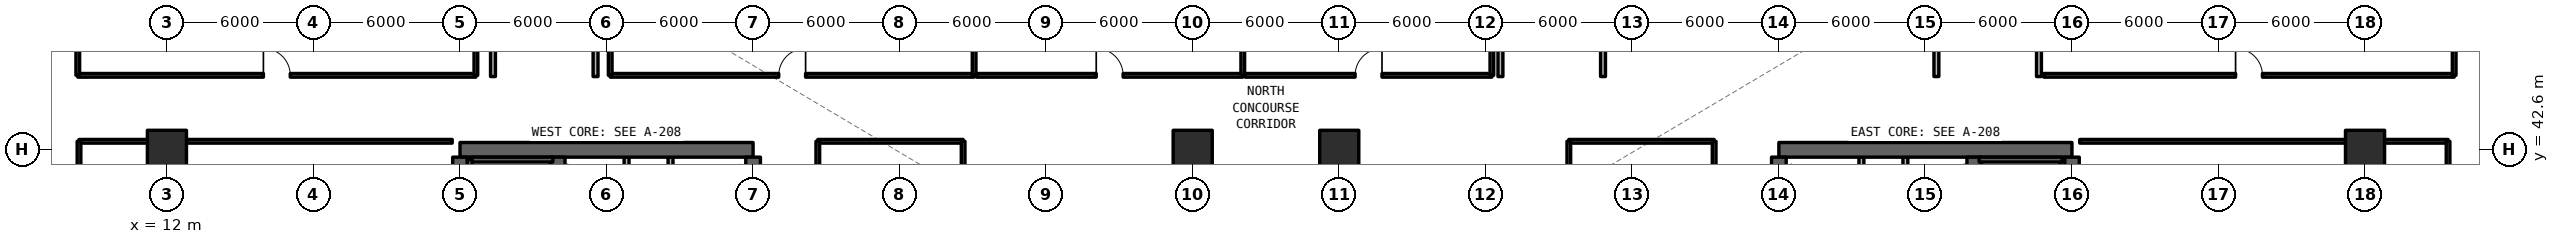
"""IFC4 building model, lengths in metres.
Left out: names, types, materials, properties, quantities, classifications, styles, units other than length and angle.
Written with IfcOpenShell. Run it as: python <this file> out.ifc"""

import sys

from ifc_helpers import new_model, si_unit, direction, frame, frame_2d, origin, origin_2d, place, context, subcontext, project, spatial, rectangle, extrude, element, fill, save


model = new_model("IFC4")
c1 = context("Model", 3, precision=1e-05, world=origin(), true_north=direction((0.0, 1.0)))
c2 = subcontext(c1, "Body", "Model", "MODEL_VIEW")
j1 = project(units=[si_unit("LENGTHUNIT", "METRE"), si_unit("PLANEANGLEUNIT", "RADIAN")], contexts=[c1])
p1 = place(None, origin())
s1 = spatial("IfcSite", under=j1, at=p1, CompositionType="ELEMENT")
p2 = place(p1, origin())
s2 = spatial("IfcBuilding", under=s1, at=p2, CompositionType="ELEMENT")
p3 = place(p2, frame((0.0, 0.0, 14.85)))
s3 = spatial("IfcBuildingStorey", under=s2, at=p3, CompositionType="ELEMENT", Elevation=14.85)
p4 = place(p3, frame((36.0, 42.6, 0.0), z_axis=(0.0, 0.0, 1.0), x_axis=(-1.0, 0.0, 0.0)))
e1 = element("IfcWall", 1, at=p4, inside=s3, PredefinedType="SHEAR", context=c2, shape_type="SweptSolid", body=[
    extrude(rectangle(XDim=12.0, YDim=0.6, at=frame_2d((6.0, 0.0))), origin(), (0.0, 0.0, 1.0), 4.62),
])
p5 = place(p3, frame((24.0, 24.9, 0.0), z_axis=(0.0, 0.0, 1.0), x_axis=(0.0, 1.0, 0.0)))
e2 = element("IfcWall", 2, at=p5, inside=s3, PredefinedType="SHEAR", context=c2, shape_type="SweptSolid", body=[
    extrude(rectangle(XDim=17.4, YDim=0.6, at=frame_2d((8.7, 0.0))), origin(), (0.0, 0.0, 1.0), 4.62),
])
p6 = place(p3, frame((36.0, 36.8, 0.0), z_axis=(0.0, 0.0, 1.0), x_axis=(0.0, 1.0, 0.0)))
e3 = element("IfcWall", 3, at=p6, inside=s3, PredefinedType="SHEAR", context=c2, shape_type="SweptSolid", body=[
    extrude(rectangle(XDim=5.5, YDim=0.6, at=frame_2d((2.75, 0.0))), origin(), (0.0, 0.0, 1.0), 4.62),
])
p7 = place(p3, frame((28.0, 24.9, 0.0), z_axis=(0.0, 0.0, 1.0), x_axis=(0.0, 1.0, 0.0)))
e4 = element("IfcWall", 4, at=p7, inside=s3, PredefinedType="SHEAR", context=c2, shape_type="SweptSolid", body=[
    extrude(rectangle(XDim=17.4, YDim=0.6, at=frame_2d((8.7, 0.0))), origin(), (0.0, 0.0, 1.0), 4.62),
])
p8 = place(p7, frame((0.35, 0.0, 0.0)))
e5 = element("IfcOpeningElement", 5, at=p8, cuts=e4, PredefinedType="OPENING", context=c2, shape_type="SweptSolid", body=[
    extrude(rectangle(XDim=1.15, YDim=2.15, at=frame_2d((0.575, 1.075))), frame((0.0, 0.31, 0.0), z_axis=(0.0, -1.0, 0.0), x_axis=(1.0, 0.0, 0.0)), (0.0, 0.0, 1.0), 0.62),
])
p9 = place(p7, frame((9.55, 0.0, 0.0)))
e6 = element("IfcOpeningElement", 6, at=p9, cuts=e4, PredefinedType="OPENING", context=c2, shape_type="SweptSolid", body=[
    extrude(rectangle(XDim=1.15, YDim=2.15, at=frame_2d((0.575, 1.075))), frame((0.0, 0.31, 0.0), z_axis=(0.0, -1.0, 0.0), x_axis=(1.0, 0.0, 0.0)), (0.0, 0.0, 1.0), 0.62),
])
p10 = place(p3, frame((90.0, 42.6, 0.0), z_axis=(0.0, 0.0, 1.0), x_axis=(-1.0, 0.0, 0.0)))
e7 = element("IfcWall", 7, at=p10, inside=s3, PredefinedType="SHEAR", context=c2, shape_type="SweptSolid", body=[
    extrude(rectangle(XDim=12.0, YDim=0.6, at=frame_2d((6.0, 0.0))), origin(), (0.0, 0.0, 1.0), 4.62),
])
p11 = place(p3, frame((90.0, 24.9, 0.0), z_axis=(0.0, 0.0, 1.0), x_axis=(0.0, 1.0, 0.0)))
e8 = element("IfcWall", 8, at=p11, inside=s3, PredefinedType="SHEAR", context=c2, shape_type="SweptSolid", body=[
    extrude(rectangle(XDim=17.4, YDim=0.6, at=frame_2d((8.7, 0.0))), origin(), (0.0, 0.0, 1.0), 4.62),
])
p12 = place(p3, frame((78.0, 36.8, 0.0), z_axis=(0.0, 0.0, 1.0), x_axis=(0.0, 1.0, 0.0)))
e9 = element("IfcWall", 9, at=p12, inside=s3, PredefinedType="SHEAR", context=c2, shape_type="SweptSolid", body=[
    extrude(rectangle(XDim=5.5, YDim=0.6, at=frame_2d((2.75, 0.0))), origin(), (0.0, 0.0, 1.0), 4.62),
])
p13 = place(p3, frame((86.0, 24.9, 0.0), z_axis=(0.0, 0.0, 1.0), x_axis=(0.0, 1.0, 0.0)))
e10 = element("IfcWall", 10, at=p13, inside=s3, PredefinedType="SHEAR", context=c2, shape_type="SweptSolid", body=[
    extrude(rectangle(XDim=17.4, YDim=0.6, at=frame_2d((8.7, 0.0))), origin(), (0.0, 0.0, 1.0), 4.62),
])
p14 = place(p13, frame((0.35, 0.0, 0.0)))
e11 = element("IfcOpeningElement", 11, at=p14, cuts=e10, PredefinedType="OPENING", context=c2, shape_type="SweptSolid", body=[
    extrude(rectangle(XDim=1.15, YDim=2.15, at=frame_2d((0.575, 1.075))), frame((0.0, 0.31, 0.0), z_axis=(0.0, -1.0, 0.0), x_axis=(1.0, 0.0, 0.0)), (0.0, 0.0, 1.0), 0.62),
])
p15 = place(p13, frame((9.55, 0.0, 0.0)))
e12 = element("IfcOpeningElement", 12, at=p15, cuts=e10, PredefinedType="OPENING", context=c2, shape_type="SweptSolid", body=[
    extrude(rectangle(XDim=1.15, YDim=2.15, at=frame_2d((0.575, 1.075))), frame((0.0, 0.31, 0.0), z_axis=(0.0, -1.0, 0.0), x_axis=(1.0, 0.0, 0.0)), (0.0, 0.0, 1.0), 0.62),
])
for number, where, z_axis, x_axis in (
    (13, (12.0, 42.6, 0.0), (0.0, 0.0, 1.0), (1.0, 0.0, 0.0)),
    (14, (54.0, 42.6, 0.0), (0.0, 0.0, 1.0), (1.0, 0.0, 0.0)),
    (15, (60.0, 42.6, 0.0), (0.0, 0.0, 1.0), (1.0, 0.0, 0.0)),
    (16, (102.0, 42.6, 0.0), (0.0, 0.0, 1.0), (1.0, 0.0, 0.0)),
):
    element("IfcColumn", number, at=place(p3, frame(where, z_axis=z_axis, x_axis=x_axis)), inside=s3, PredefinedType="COLUMN", context=c2, shape_type="SweptSolid", body=[
        extrude(rectangle(XDim=1.6, YDim=1.6, at=origin_2d()), origin(), (0.0, 0.0, 1.0), 4.62),
    ])
for number, where, z_axis, x_axis in (
    (17, (30.82, 36.88, 0.0), (0.0, 0.0, 1.0), (0.0, 1.0, 0.0)),
    (18, (32.62, 36.88, 0.0), (0.0, 0.0, 1.0), (0.0, 1.0, 0.0)),
    (19, (83.18, 36.88, 0.0), (0.0, 0.0, 1.0), (0.0, 1.0, 0.0)),
    (20, (81.38, 36.88, 0.0), (0.0, 0.0, 1.0), (0.0, 1.0, 0.0)),
):
    element("IfcWall", number, at=place(p3, frame(where, z_axis=z_axis, x_axis=x_axis)), inside=s3, PredefinedType="SOLIDWALL", context=c2, shape_type="SweptSolid", body=[
        extrude(rectangle(XDim=5.42, YDim=0.2, at=frame_2d((2.71, 0.0))), origin(), (0.0, 0.0, 1.0), 3.56),
    ])
for number, where, z_axis, x_axis in (
    (21, (25.35, 45.6, 0.0), (0.0, 0.0, 1.0), (0.0, 1.0, 0.0)),
    (22, (29.55, 45.6, 0.0), (0.0, 0.0, 1.0), (0.0, 1.0, 0.0)),
    (23, (66.6, 45.6, 0.0), (0.0, 0.0, 1.0), (0.0, 1.0, 0.0)),
    (24, (70.8, 45.6, 0.0), (0.0, 0.0, 1.0), (0.0, 1.0, 0.0)),
    (25, (84.45, 45.6, 0.0), (0.0, 0.0, 1.0), (0.0, 1.0, 0.0)),
    (26, (88.65, 45.6, 0.0), (0.0, 0.0, 1.0), (0.0, 1.0, 0.0)),
):
    element("IfcWall", number, at=place(p3, frame(where, z_axis=z_axis, x_axis=x_axis)), inside=s3, PredefinedType="SOLIDWALL", context=c2, shape_type="SweptSolid", body=[
        extrude(rectangle(XDim=4.6, YDim=0.2, at=frame_2d((2.3, 0.0))), origin(), (0.0, 0.0, 1.0), 3.56),
    ])
p16 = place(p3, frame((8.35, 45.65, 0.0), z_axis=(0.0, 0.0, 1.0), x_axis=(1.0, 0.0, 0.0)))
e27 = element("IfcWall", 27, at=p16, inside=s3, PredefinedType="SOLIDWALL", context=c2, shape_type="SweptSolid", body=[
    extrude(rectangle(XDim=16.3, YDim=0.15, at=frame_2d((8.15, 0.0))), origin(), (0.0, 0.0, 1.0), 3.56),
])
p17 = place(p16, frame((7.6, 0.0, 0.0)))
e28 = element("IfcOpeningElement", 28, at=p17, cuts=e27, PredefinedType="OPENING", context=c2, shape_type="SweptSolid", body=[
    extrude(rectangle(XDim=1.1, YDim=2.15, at=frame_2d((0.55, 1.075))), frame((0.0, 0.085, 0.0), z_axis=(0.0, -1.0, 0.0), x_axis=(1.0, 0.0, 0.0)), (0.0, 0.0, 1.0), 0.17),
])
for number, where, z_axis, x_axis in (
    (29, (8.35, 45.65, 0.0), (0.0, 0.0, 1.0), (0.0, 1.0, 0.0)),
    (30, (24.65, 45.65, 0.0), (0.0, 0.0, 1.0), (0.0, 1.0, 0.0)),
):
    element("IfcWall", number, at=place(p3, frame(where, z_axis=z_axis, x_axis=x_axis)), inside=s3, PredefinedType="SOLIDWALL", context=c2, shape_type="SweptSolid", body=[
        extrude(rectangle(XDim=18.41, YDim=0.15, at=frame_2d((9.205, 0.0))), origin(), (0.0, 0.0, 1.0), 3.56),
    ])
p18 = place(p3, frame((30.15, 45.65, 0.0), z_axis=(0.0, 0.0, 1.0), x_axis=(1.0, 0.0, 0.0)))
e31 = element("IfcWall", 31, at=p18, inside=s3, PredefinedType="SOLIDWALL", context=c2, shape_type="SweptSolid", body=[
    extrude(rectangle(XDim=14.9, YDim=0.15, at=frame_2d((7.45, 0.0))), origin(), (0.0, 0.0, 1.0), 3.56),
])
p19 = place(p18, frame((6.9, 0.0, 0.0)))
e32 = element("IfcOpeningElement", 32, at=p19, cuts=e31, PredefinedType="OPENING", context=c2, shape_type="SweptSolid", body=[
    extrude(rectangle(XDim=1.1, YDim=2.15, at=frame_2d((0.55, 1.075))), frame((0.0, 0.085, 0.0), z_axis=(0.0, -1.0, 0.0), x_axis=(1.0, 0.0, 0.0)), (0.0, 0.0, 1.0), 0.17),
])
for number, where, z_axis, x_axis in (
    (33, (30.15, 45.65, 0.0), (0.0, 0.0, 1.0), (0.0, 1.0, 0.0)),
    (34, (45.05, 45.65, 0.0), (0.0, 0.0, 1.0), (0.0, 1.0, 0.0)),
):
    element("IfcWall", number, at=place(p3, frame(where, z_axis=z_axis, x_axis=x_axis)), inside=s3, PredefinedType="SOLIDWALL", context=c2, shape_type="SweptSolid", body=[
        extrude(rectangle(XDim=18.41, YDim=0.15, at=frame_2d((9.205, 0.0))), origin(), (0.0, 0.0, 1.0), 3.56),
    ])
p20 = place(p3, frame((45.15, 45.65, 0.0), z_axis=(0.0, 0.0, 1.0), x_axis=(1.0, 0.0, 0.0)))
e35 = element("IfcWall", 35, at=p20, inside=s3, PredefinedType="SOLIDWALL", context=c2, shape_type="SweptSolid", body=[
    extrude(rectangle(XDim=10.9, YDim=0.15, at=frame_2d((5.45, 0.0))), origin(), (0.0, 0.0, 1.0), 3.56),
])
p21 = place(p20, frame((4.9, 0.0, 0.0)))
e36 = element("IfcOpeningElement", 36, at=p21, cuts=e35, PredefinedType="OPENING", context=c2, shape_type="SweptSolid", body=[
    extrude(rectangle(XDim=1.1, YDim=2.15, at=frame_2d((0.55, 1.075))), frame((0.0, 0.085, 0.0), z_axis=(0.0, -1.0, 0.0), x_axis=(1.0, 0.0, 0.0)), (0.0, 0.0, 1.0), 0.17),
])
p22 = place(p3, frame((56.05, 45.65, 0.0), z_axis=(0.0, 0.0, 1.0), x_axis=(0.0, 1.0, 0.0)))
e37 = element("IfcWall", 37, at=p22, inside=s3, PredefinedType="SOLIDWALL", context=c2, shape_type="SweptSolid", body=[
    extrude(rectangle(XDim=18.41, YDim=0.15, at=frame_2d((9.205, 0.0))), origin(), (0.0, 0.0, 1.0), 3.56),
])
p23 = place(p3, frame((56.15, 45.65, 0.0), z_axis=(0.0, 0.0, 1.0), x_axis=(1.0, 0.0, 0.0)))
e38 = element("IfcWall", 38, at=p23, inside=s3, PredefinedType="SOLIDWALL", context=c2, shape_type="SweptSolid", body=[
    extrude(rectangle(XDim=10.1, YDim=0.15, at=frame_2d((5.05, 0.0))), origin(), (0.0, 0.0, 1.0), 3.56),
])
p24 = place(p23, frame((4.5, 0.0, 0.0)))
e39 = element("IfcOpeningElement", 39, at=p24, cuts=e38, PredefinedType="OPENING", context=c2, shape_type="SweptSolid", body=[
    extrude(rectangle(XDim=1.1, YDim=2.15, at=frame_2d((0.55, 1.075))), frame((0.0, 0.085, 0.0), z_axis=(0.0, -1.0, 0.0), x_axis=(1.0, 0.0, 0.0)), (0.0, 0.0, 1.0), 0.17),
])
p25 = place(p3, frame((66.25, 45.65, 0.0), z_axis=(0.0, 0.0, 1.0), x_axis=(0.0, 1.0, 0.0)))
e40 = element("IfcWall", 40, at=p25, inside=s3, PredefinedType="SOLIDWALL", context=c2, shape_type="SweptSolid", body=[
    extrude(rectangle(XDim=18.41, YDim=0.15, at=frame_2d((9.205, 0.0))), origin(), (0.0, 0.0, 1.0), 3.56),
])
p26 = place(p3, frame((88.85, 45.65, 0.0), z_axis=(0.0, 0.0, 1.0), x_axis=(1.0, 0.0, 0.0)))
e41 = element("IfcWall", 41, at=p26, inside=s3, PredefinedType="SOLIDWALL", context=c2, shape_type="SweptSolid", body=[
    extrude(rectangle(XDim=16.8, YDim=0.15, at=frame_2d((8.4, 0.0))), origin(), (0.0, 0.0, 1.0), 3.56),
])
p27 = place(p26, frame((7.85, 0.0, 0.0)))
e42 = element("IfcOpeningElement", 42, at=p27, cuts=e41, PredefinedType="OPENING", context=c2, shape_type="SweptSolid", body=[
    extrude(rectangle(XDim=1.1, YDim=2.15, at=frame_2d((0.55, 1.075))), frame((0.0, 0.085, 0.0), z_axis=(0.0, -1.0, 0.0), x_axis=(1.0, 0.0, 0.0)), (0.0, 0.0, 1.0), 0.17),
])
p28 = place(p3, frame((105.65, 45.65, 0.0), z_axis=(0.0, 0.0, 1.0), x_axis=(0.0, 1.0, 0.0)))
e43 = element("IfcWall", 43, at=p28, inside=s3, PredefinedType="SOLIDWALL", context=c2, shape_type="SweptSolid", body=[
    extrude(rectangle(XDim=18.41, YDim=0.15, at=frame_2d((9.205, 0.0))), origin(), (0.0, 0.0, 1.0), 3.56),
])
p29 = place(p3, frame((38.65, 42.95, 0.0), z_axis=(0.0, 0.0, 1.0), x_axis=(1.0, 0.0, 0.0)))
e44 = element("IfcWall", 44, at=p29, inside=s3, PredefinedType="SOLIDWALL", context=c2, shape_type="SweptSolid", body=[
    extrude(rectangle(XDim=5.95, YDim=0.15, at=frame_2d((2.975, 0.0))), origin(), (0.0, 0.0, 1.0), 3.56),
])
p30 = place(p3, frame((38.65, 24.25, 0.0), z_axis=(0.0, 0.0, 1.0), x_axis=(0.0, 1.0, 0.0)))
e45 = element("IfcWall", 45, at=p30, inside=s3, PredefinedType="SOLIDWALL", context=c2, shape_type="SweptSolid", body=[
    extrude(rectangle(XDim=18.7, YDim=0.15, at=frame_2d((9.35, 0.0))), origin(), (0.0, 0.0, 1.0), 3.56),
])
p31 = place(p30, frame((8.525, 0.0, 0.0)))
e46 = element("IfcOpeningElement", 46, at=p31, cuts=e45, PredefinedType="OPENING", context=c2, shape_type="SweptSolid", body=[
    extrude(rectangle(XDim=0.95, YDim=2.15, at=frame_2d((0.475, 1.075))), frame((0.0, 0.085, 0.0), z_axis=(0.0, -1.0, 0.0), x_axis=(1.0, 0.0, 0.0)), (0.0, 0.0, 1.0), 0.17),
])
p32 = place(p3, frame((44.6, 24.25, 0.0), z_axis=(0.0, 0.0, 1.0), x_axis=(0.0, 1.0, 0.0)))
e47 = element("IfcWall", 47, at=p32, inside=s3, PredefinedType="SOLIDWALL", context=c2, shape_type="SweptSolid", body=[
    extrude(rectangle(XDim=18.7, YDim=0.15, at=frame_2d((9.35, 0.0))), origin(), (0.0, 0.0, 1.0), 3.56),
])
p33 = place(p3, frame((69.4, 42.95, 0.0), z_axis=(0.0, 0.0, 1.0), x_axis=(1.0, 0.0, 0.0)))
e48 = element("IfcWall", 48, at=p33, inside=s3, PredefinedType="SOLIDWALL", context=c2, shape_type="SweptSolid", body=[
    extrude(rectangle(XDim=5.95, YDim=0.15, at=frame_2d((2.975, 0.0))), origin(), (0.0, 0.0, 1.0), 3.56),
])
p34 = place(p3, frame((69.4, 24.25, 0.0), z_axis=(0.0, 0.0, 1.0), x_axis=(0.0, 1.0, 0.0)))
e49 = element("IfcWall", 49, at=p34, inside=s3, PredefinedType="SOLIDWALL", context=c2, shape_type="SweptSolid", body=[
    extrude(rectangle(XDim=18.7, YDim=0.15, at=frame_2d((9.35, 0.0))), origin(), (0.0, 0.0, 1.0), 3.56),
])
p35 = place(p3, frame((75.35, 24.25, 0.0), z_axis=(0.0, 0.0, 1.0), x_axis=(0.0, 1.0, 0.0)))
e50 = element("IfcWall", 50, at=p35, inside=s3, PredefinedType="SOLIDWALL", context=c2, shape_type="SweptSolid", body=[
    extrude(rectangle(XDim=18.7, YDim=0.15, at=frame_2d((9.35, 0.0))), origin(), (0.0, 0.0, 1.0), 3.56),
])
p36 = place(p35, frame((8.525, 0.0, 0.0)))
e51 = element("IfcOpeningElement", 51, at=p36, cuts=e50, PredefinedType="OPENING", context=c2, shape_type="SweptSolid", body=[
    extrude(rectangle(XDim=0.95, YDim=2.15, at=frame_2d((0.475, 1.075))), frame((0.0, 0.085, 0.0), z_axis=(0.0, -1.0, 0.0), x_axis=(1.0, 0.0, 0.0)), (0.0, 0.0, 1.0), 0.17),
])
p37 = place(p3, frame((8.4, 42.95, 0.0), z_axis=(0.0, 0.0, 1.0), x_axis=(1.0, 0.0, 0.0)))
e52 = element("IfcWall", 52, at=p37, inside=s3, PredefinedType="SOLIDWALL", context=c2, shape_type="SweptSolid", body=[
    extrude(rectangle(XDim=15.28, YDim=0.15, at=frame_2d((7.64, 0.0))), origin(), (0.0, 0.0, 1.0), 3.56),
])
p38 = place(p3, frame((8.4, 24.25, 0.0), z_axis=(0.0, 0.0, 1.0), x_axis=(0.0, 1.0, 0.0)))
e53 = element("IfcWall", 53, at=p38, inside=s3, PredefinedType="SOLIDWALL", context=c2, shape_type="SweptSolid", body=[
    extrude(rectangle(XDim=18.7, YDim=0.15, at=frame_2d((9.35, 0.0))), origin(), (0.0, 0.0, 1.0), 3.56),
])
p39 = place(p3, frame((90.32, 42.95, 0.0), z_axis=(0.0, 0.0, 1.0), x_axis=(1.0, 0.0, 0.0)))
e54 = element("IfcWall", 54, at=p39, inside=s3, PredefinedType="SOLIDWALL", context=c2, shape_type="SweptSolid", body=[
    extrude(rectangle(XDim=15.08, YDim=0.15, at=frame_2d((7.54, 0.0))), origin(), (0.0, 0.0, 1.0), 3.56),
])
p40 = place(p3, frame((105.4, 24.25, 0.0), z_axis=(0.0, 0.0, 1.0), x_axis=(0.0, 1.0, 0.0)))
e55 = element("IfcWall", 55, at=p40, inside=s3, PredefinedType="SOLIDWALL", context=c2, shape_type="SweptSolid", body=[
    extrude(rectangle(XDim=18.7, YDim=0.15, at=frame_2d((9.35, 0.0))), origin(), (0.0, 0.0, 1.0), 3.56),
])
p41 = place(p3, frame((27.8, 42.2, 0.0), z_axis=(0.0, 0.0, 1.0), x_axis=(-1.0, 0.0, 0.0)))
e56 = element("IfcWall", 56, at=p41, inside=s3, PredefinedType="SOLIDWALL", context=c2, shape_type="SweptSolid", body=[
    extrude(rectangle(XDim=3.4, YDim=0.2, at=frame_2d((1.7, 0.0))), origin(), (0.0, 0.0, 1.0), 4.62),
])
for number, where, z_axis, x_axis in (
    (57, (24.4, 42.2, 0.0), (0.0, 0.0, 1.0), (0.0, -1.0, 0.0)),
    (58, (89.6, 34.2, 0.0), (0.0, 0.0, 1.0), (0.0, 1.0, 0.0)),
):
    element("IfcWall", number, at=place(p3, frame(where, z_axis=z_axis, x_axis=x_axis)), inside=s3, PredefinedType="SOLIDWALL", context=c2, shape_type="SweptSolid", body=[
        extrude(rectangle(XDim=8.0, YDim=0.2, at=frame_2d((4.0, 0.0))), origin(), (0.0, 0.0, 1.0), 4.62),
    ])
p42 = place(p3, frame((89.6, 42.2, 0.0), z_axis=(0.0, 0.0, 1.0), x_axis=(-1.0, 0.0, 0.0)))
e59 = element("IfcWall", 59, at=p42, inside=s3, PredefinedType="SOLIDWALL", context=c2, shape_type="SweptSolid", body=[
    extrude(rectangle(XDim=3.4, YDim=0.2, at=frame_2d((1.7, 0.0))), origin(), (0.0, 0.0, 1.0), 4.62),
])
p43 = place(p17, origin())
e60 = element("IfcDoor", 60, at=p43, inside=s3, OperationType="SINGLE_SWING_LEFT", PredefinedType="DOOR", context=c2, shape_type="SweptSolid", body=[
    extrude(rectangle(XDim=1.1, YDim=2.15, at=frame_2d((0.55, 1.075))), frame((0.0, 0.025, 0.0), z_axis=(0.0, -1.0, 0.0), x_axis=(1.0, 0.0, 0.0)), (0.0, 0.0, 1.0), 0.05),
])
fill(e28, e60)
p44 = place(p19, origin())
e61 = element("IfcDoor", 61, at=p44, inside=s3, OperationType="SINGLE_SWING_RIGHT", PredefinedType="DOOR", context=c2, shape_type="SweptSolid", body=[
    extrude(rectangle(XDim=1.1, YDim=2.15, at=frame_2d((0.55, 1.075))), frame((0.0, 0.025, 0.0), z_axis=(0.0, -1.0, 0.0), x_axis=(1.0, 0.0, 0.0)), (0.0, 0.0, 1.0), 0.05),
])
fill(e32, e61)
p45 = place(p21, origin())
e62 = element("IfcDoor", 62, at=p45, inside=s3, OperationType="SINGLE_SWING_LEFT", PredefinedType="DOOR", context=c2, shape_type="SweptSolid", body=[
    extrude(rectangle(XDim=1.1, YDim=2.15, at=frame_2d((0.55, 1.075))), frame((0.0, 0.025, 0.0), z_axis=(0.0, -1.0, 0.0), x_axis=(1.0, 0.0, 0.0)), (0.0, 0.0, 1.0), 0.05),
])
fill(e36, e62)
p46 = place(p24, origin())
e63 = element("IfcDoor", 63, at=p46, inside=s3, OperationType="SINGLE_SWING_RIGHT", PredefinedType="DOOR", context=c2, shape_type="SweptSolid", body=[
    extrude(rectangle(XDim=1.1, YDim=2.15, at=frame_2d((0.55, 1.075))), frame((0.0, 0.025, 0.0), z_axis=(0.0, -1.0, 0.0), x_axis=(1.0, 0.0, 0.0)), (0.0, 0.0, 1.0), 0.05),
])
fill(e39, e63)
p47 = place(p27, origin())
e64 = element("IfcDoor", 64, at=p47, inside=s3, OperationType="SINGLE_SWING_LEFT", PredefinedType="DOOR", context=c2, shape_type="SweptSolid", body=[
    extrude(rectangle(XDim=1.1, YDim=2.15, at=frame_2d((0.55, 1.075))), frame((0.0, 0.025, 0.0), z_axis=(0.0, -1.0, 0.0), x_axis=(1.0, 0.0, 0.0)), (0.0, 0.0, 1.0), 0.05),
])
fill(e42, e64)
save(model, sys.argv[1])
